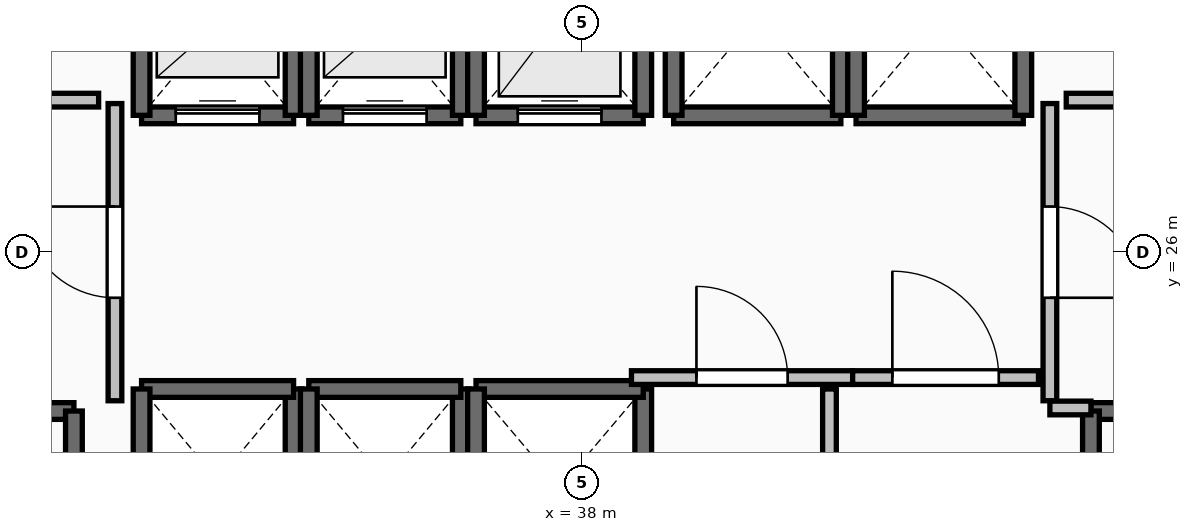
"""IFC4 building model, lengths in metres.
Left out: names, types, materials, properties, quantities, classifications, styles, units other than length and angle.
Written with IfcOpenShell. Run it as: python <this file> out.ifc"""

import sys

from ifc_helpers import new_model, si_unit, direction, frame, frame_2d, origin, place, context, subcontext, project, spatial, rectangle, extrude, element, fill, save


model = new_model("IFC4")
c1 = context("Model", 3, precision=1e-05, world=origin(), true_north=direction((0.0, 1.0)))
c2 = subcontext(c1, "Body", "Model", "MODEL_VIEW")
j1 = project(units=[si_unit("LENGTHUNIT", "METRE"), si_unit("PLANEANGLEUNIT", "RADIAN")], contexts=[c1])
p1 = place(None, origin())
s1 = spatial("IfcSite", under=j1, at=p1, CompositionType="ELEMENT")
p2 = place(p1, origin())
s2 = spatial("IfcBuilding", under=s1, at=p2, CompositionType="ELEMENT")
p3 = place(p2, frame((0.0, 0.0, 69.5)))
s3 = spatial("IfcBuildingStorey", under=s2, at=p3, CompositionType="ELEMENT", Elevation=69.5)
p4 = place(p3, frame((27.94, 23.91, 0.0), z_axis=(0.0, 0.0, 1.0), x_axis=(1.0, 0.0, 0.0)))
e1 = element("IfcWall", 1, at=p4, inside=s3, PredefinedType="SOLIDWALL", context=c2, shape_type="SweptSolid", body=[
    extrude(rectangle(XDim=3.37, YDim=0.22, at=frame_2d((1.685, 0.0))), origin(), (0.0, 0.0, 1.0), 4.5),
])
p5 = place(p4, frame((1.135, 0.0, 0.0)))
e2 = element("IfcOpeningElement", 2, at=p5, cuts=e1, PredefinedType="OPENING", context=c2, shape_type="SweptSolid", body=[
    extrude(rectangle(XDim=1.1, YDim=2.15, at=frame_2d((0.55, 1.075))), frame((0.0, 0.125, 0.0), z_axis=(0.0, -1.0, 0.0), x_axis=(1.0, 0.0, 0.0)), (0.0, 0.0, 1.0), 0.25),
])
p6 = place(p3, frame((31.31, 23.91, 0.0), z_axis=(0.0, 0.0, 1.0), x_axis=(0.0, -1.0, 0.0)))
e3 = element("IfcWall", 3, at=p6, inside=s3, PredefinedType="SOLIDWALL", context=c2, shape_type="SweptSolid", body=[
    extrude(rectangle(XDim=7.42, YDim=0.22, at=frame_2d((3.71, 0.0))), origin(), (0.0, 0.0, 1.0), 4.5),
])
p7 = place(p3, frame((44.69, 23.91, 0.0), z_axis=(0.0, 0.0, 1.0), x_axis=(1.0, 0.0, 0.0)))
e4 = element("IfcWall", 4, at=p7, inside=s3, PredefinedType="SOLIDWALL", context=c2, shape_type="SweptSolid", body=[
    extrude(rectangle(XDim=3.37, YDim=0.22, at=frame_2d((1.685, 0.0))), origin(), (0.0, 0.0, 1.0), 4.5),
])
p8 = place(p7, frame((1.135, 0.0, 0.0)))
e5 = element("IfcOpeningElement", 5, at=p8, cuts=e4, PredefinedType="OPENING", context=c2, shape_type="SweptSolid", body=[
    extrude(rectangle(XDim=1.1, YDim=2.15, at=frame_2d((0.55, 1.075))), frame((0.0, 0.125, 0.0), z_axis=(0.0, -1.0, 0.0), x_axis=(1.0, 0.0, 0.0)), (0.0, 0.0, 1.0), 0.25),
])
p9 = place(p3, frame((44.69, 16.49, 0.0), z_axis=(0.0, 0.0, 1.0), x_axis=(0.0, 1.0, 0.0)))
e6 = element("IfcWall", 6, at=p9, inside=s3, PredefinedType="SOLIDWALL", context=c2, shape_type="SweptSolid", body=[
    extrude(rectangle(XDim=7.42, YDim=0.22, at=frame_2d((3.71, 0.0))), origin(), (0.0, 0.0, 1.0), 4.5),
])
p10 = place(p3, frame((32.2, 27.8, 0.0), z_axis=(0.0, 0.0, 1.0), x_axis=(1.0, 0.0, 0.0)))
e7 = element("IfcWall", 7, at=p10, inside=s3, PredefinedType="SOLIDWALL", context=c2, shape_type="SweptSolid", body=[
    extrude(rectangle(XDim=2.0, YDim=0.22, at=frame_2d((1.0, 0.0))), origin(), (0.0, 0.0, 1.0), 4.5),
])
p11 = place(p10, frame((0.45, 0.0, 0.0)))
e8 = element("IfcOpeningElement", 8, at=p11, cuts=e7, PredefinedType="OPENING", context=c2, shape_type="SweptSolid", body=[
    extrude(rectangle(XDim=1.1, YDim=2.2, at=frame_2d((0.55, 1.1))), frame((0.0, 0.125, 0.0), z_axis=(0.0, -1.0, 0.0), x_axis=(1.0, 0.0, 0.0)), (0.0, 0.0, 1.0), 0.25),
])
for number, where, z_axis, x_axis in (
    (9, (34.2, 27.8, 0.0), (0.0, 0.0, 1.0), (0.0, 1.0, 0.0)),
    (10, (32.2, 30.2, 0.0), (0.0, 0.0, 1.0), (0.0, -1.0, 0.0)),
):
    element("IfcWall", number, at=place(p3, frame(where, z_axis=z_axis, x_axis=x_axis)), inside=s3, PredefinedType="SOLIDWALL", context=c2, shape_type="SweptSolid", body=[
        extrude(rectangle(XDim=2.4, YDim=0.22, at=frame_2d((1.2, 0.0))), origin(), (0.0, 0.0, 1.0), 4.5),
    ])
p12 = place(p3, frame((34.4, 27.8, 0.0), z_axis=(0.0, 0.0, 1.0), x_axis=(1.0, 0.0, 0.0)))
e11 = element("IfcWall", 11, at=p12, inside=s3, PredefinedType="SOLIDWALL", context=c2, shape_type="SweptSolid", body=[
    extrude(rectangle(XDim=2.0, YDim=0.22, at=frame_2d((1.0, 0.0))), origin(), (0.0, 0.0, 1.0), 4.5),
])
p13 = place(p12, frame((0.45, 0.0, 0.0)))
e12 = element("IfcOpeningElement", 12, at=p13, cuts=e11, PredefinedType="OPENING", context=c2, shape_type="SweptSolid", body=[
    extrude(rectangle(XDim=1.1, YDim=2.2, at=frame_2d((0.55, 1.1))), frame((0.0, 0.125, 0.0), z_axis=(0.0, -1.0, 0.0), x_axis=(1.0, 0.0, 0.0)), (0.0, 0.0, 1.0), 0.25),
])
for number, where, z_axis, x_axis in (
    (13, (36.4, 27.8, 0.0), (0.0, 0.0, 1.0), (0.0, 1.0, 0.0)),
    (14, (34.4, 30.2, 0.0), (0.0, 0.0, 1.0), (0.0, -1.0, 0.0)),
):
    element("IfcWall", number, at=place(p3, frame(where, z_axis=z_axis, x_axis=x_axis)), inside=s3, PredefinedType="SOLIDWALL", context=c2, shape_type="SweptSolid", body=[
        extrude(rectangle(XDim=2.4, YDim=0.22, at=frame_2d((1.2, 0.0))), origin(), (0.0, 0.0, 1.0), 4.5),
    ])
p14 = place(p3, frame((36.6, 27.8, 0.0), z_axis=(0.0, 0.0, 1.0), x_axis=(1.0, 0.0, 0.0)))
e15 = element("IfcWall", 15, at=p14, inside=s3, PredefinedType="SOLIDWALL", context=c2, shape_type="SweptSolid", body=[
    extrude(rectangle(XDim=2.2, YDim=0.22, at=frame_2d((1.1, 0.0))), origin(), (0.0, 0.0, 1.0), 4.5),
])
p15 = place(p14, frame((0.55, 0.0, 0.0)))
e16 = element("IfcOpeningElement", 16, at=p15, cuts=e15, PredefinedType="OPENING", context=c2, shape_type="SweptSolid", body=[
    extrude(rectangle(XDim=1.1, YDim=2.2, at=frame_2d((0.55, 1.1))), frame((0.0, 0.125, 0.0), z_axis=(0.0, -1.0, 0.0), x_axis=(1.0, 0.0, 0.0)), (0.0, 0.0, 1.0), 0.25),
])
for number, where, z_axis, x_axis in (
    (17, (38.8, 27.8, 0.0), (0.0, 0.0, 1.0), (0.0, 1.0, 0.0)),
    (18, (36.6, 30.4, 0.0), (0.0, 0.0, 1.0), (0.0, -1.0, 0.0)),
):
    element("IfcWall", number, at=place(p3, frame(where, z_axis=z_axis, x_axis=x_axis)), inside=s3, PredefinedType="SOLIDWALL", context=c2, shape_type="SweptSolid", body=[
        extrude(rectangle(XDim=2.6, YDim=0.22, at=frame_2d((1.3, 0.0))), origin(), (0.0, 0.0, 1.0), 4.5),
    ])
p16 = place(p3, frame((34.2, 21.8, 0.0), z_axis=(0.0, 0.0, 1.0), x_axis=(0.0, 1.0, 0.0)))
e19 = element("IfcWall", 19, at=p16, inside=s3, PredefinedType="SOLIDWALL", context=c2, shape_type="SweptSolid", body=[
    extrude(rectangle(XDim=2.4, YDim=0.22, at=frame_2d((1.2, 0.0))), origin(), (0.0, 0.0, 1.0), 4.5),
])
p17 = place(p3, frame((34.2, 24.2, 0.0), z_axis=(0.0, 0.0, 1.0), x_axis=(-1.0, 0.0, 0.0)))
e20 = element("IfcWall", 20, at=p17, inside=s3, PredefinedType="SOLIDWALL", context=c2, shape_type="SweptSolid", body=[
    extrude(rectangle(XDim=2.0, YDim=0.22, at=frame_2d((1.0, 0.0))), origin(), (0.0, 0.0, 1.0), 4.5),
])
for number, where, z_axis, x_axis in (
    (21, (32.2, 24.2, 0.0), (0.0, 0.0, 1.0), (0.0, -1.0, 0.0)),
    (22, (36.4, 21.8, 0.0), (0.0, 0.0, 1.0), (0.0, 1.0, 0.0)),
):
    element("IfcWall", number, at=place(p3, frame(where, z_axis=z_axis, x_axis=x_axis)), inside=s3, PredefinedType="SOLIDWALL", context=c2, shape_type="SweptSolid", body=[
        extrude(rectangle(XDim=2.4, YDim=0.22, at=frame_2d((1.2, 0.0))), origin(), (0.0, 0.0, 1.0), 4.5),
    ])
p18 = place(p3, frame((36.4, 24.2, 0.0), z_axis=(0.0, 0.0, 1.0), x_axis=(-1.0, 0.0, 0.0)))
e23 = element("IfcWall", 23, at=p18, inside=s3, PredefinedType="SOLIDWALL", context=c2, shape_type="SweptSolid", body=[
    extrude(rectangle(XDim=2.0, YDim=0.22, at=frame_2d((1.0, 0.0))), origin(), (0.0, 0.0, 1.0), 4.5),
])
p19 = place(p3, frame((34.4, 24.2, 0.0), z_axis=(0.0, 0.0, 1.0), x_axis=(0.0, -1.0, 0.0)))
e24 = element("IfcWall", 24, at=p19, inside=s3, PredefinedType="SOLIDWALL", context=c2, shape_type="SweptSolid", body=[
    extrude(rectangle(XDim=2.4, YDim=0.22, at=frame_2d((1.2, 0.0))), origin(), (0.0, 0.0, 1.0), 4.5),
])
p20 = place(p3, frame((38.8, 21.6, 0.0), z_axis=(0.0, 0.0, 1.0), x_axis=(0.0, 1.0, 0.0)))
e25 = element("IfcWall", 25, at=p20, inside=s3, PredefinedType="SOLIDWALL", context=c2, shape_type="SweptSolid", body=[
    extrude(rectangle(XDim=2.6, YDim=0.22, at=frame_2d((1.3, 0.0))), origin(), (0.0, 0.0, 1.0), 4.5),
])
p21 = place(p3, frame((38.8, 24.2, 0.0), z_axis=(0.0, 0.0, 1.0), x_axis=(-1.0, 0.0, 0.0)))
e26 = element("IfcWall", 26, at=p21, inside=s3, PredefinedType="SOLIDWALL", context=c2, shape_type="SweptSolid", body=[
    extrude(rectangle(XDim=2.2, YDim=0.22, at=frame_2d((1.1, 0.0))), origin(), (0.0, 0.0, 1.0), 4.5),
])
p22 = place(p3, frame((36.6, 24.2, 0.0), z_axis=(0.0, 0.0, 1.0), x_axis=(0.0, -1.0, 0.0)))
e27 = element("IfcWall", 27, at=p22, inside=s3, PredefinedType="SOLIDWALL", context=c2, shape_type="SweptSolid", body=[
    extrude(rectangle(XDim=2.6, YDim=0.22, at=frame_2d((1.3, 0.0))), origin(), (0.0, 0.0, 1.0), 4.5),
])
p23 = place(p3, frame((39.2, 27.8, 0.0), z_axis=(0.0, 0.0, 1.0), x_axis=(1.0, 0.0, 0.0)))
e28 = element("IfcWall", 28, at=p23, inside=s3, PredefinedType="SOLIDWALL", context=c2, shape_type="SweptSolid", body=[
    extrude(rectangle(XDim=2.2, YDim=0.22, at=frame_2d((1.1, 0.0))), origin(), (0.0, 0.0, 1.0), 4.5),
])
for number, where, z_axis, x_axis in (
    (29, (41.4, 27.8, 0.0), (0.0, 0.0, 1.0), (0.0, 1.0, 0.0)),
    (30, (39.2, 30.4, 0.0), (0.0, 0.0, 1.0), (0.0, -1.0, 0.0)),
):
    element("IfcWall", number, at=place(p3, frame(where, z_axis=z_axis, x_axis=x_axis)), inside=s3, PredefinedType="SOLIDWALL", context=c2, shape_type="SweptSolid", body=[
        extrude(rectangle(XDim=2.6, YDim=0.22, at=frame_2d((1.3, 0.0))), origin(), (0.0, 0.0, 1.0), 4.5),
    ])
p24 = place(p3, frame((41.6, 27.8, 0.0), z_axis=(0.0, 0.0, 1.0), x_axis=(1.0, 0.0, 0.0)))
e31 = element("IfcWall", 31, at=p24, inside=s3, PredefinedType="SOLIDWALL", context=c2, shape_type="SweptSolid", body=[
    extrude(rectangle(XDim=2.2, YDim=0.22, at=frame_2d((1.1, 0.0))), origin(), (0.0, 0.0, 1.0), 4.5),
])
for number, where, z_axis, x_axis in (
    (32, (43.8, 27.8, 0.0), (0.0, 0.0, 1.0), (0.0, 1.0, 0.0)),
    (33, (41.6, 30.4, 0.0), (0.0, 0.0, 1.0), (0.0, -1.0, 0.0)),
):
    element("IfcWall", number, at=place(p3, frame(where, z_axis=z_axis, x_axis=x_axis)), inside=s3, PredefinedType="SOLIDWALL", context=c2, shape_type="SweptSolid", body=[
        extrude(rectangle(XDim=2.6, YDim=0.22, at=frame_2d((1.3, 0.0))), origin(), (0.0, 0.0, 1.0), 4.5),
    ])
p25 = place(p3, frame((31.85, 24.045, 0.0), z_axis=(0.0, 0.0, 1.0), x_axis=(0.0, 1.0, 0.0)))
e34 = element("IfcWall", 34, at=p25, inside=s3, PredefinedType="PARTITIONING", context=c2, shape_type="SweptSolid", body=[
    extrude(rectangle(XDim=3.91, YDim=0.18, at=frame_2d((1.955, 0.0))), origin(), (0.0, 0.0, 1.0), 4.5),
])
p26 = place(p25, frame((1.355, 0.0, 0.0)))
e35 = element("IfcOpeningElement", 35, at=p26, cuts=e34, PredefinedType="OPENING", context=c2, shape_type="SweptSolid", body=[
    extrude(rectangle(XDim=1.2, YDim=2.15, at=frame_2d((0.6, 1.075))), frame((0.0, 0.105, 0.0), z_axis=(0.0, -1.0, 0.0), x_axis=(1.0, 0.0, 0.0)), (0.0, 0.0, 1.0), 0.21),
])
p27 = place(p3, frame((44.15, 27.955, 0.0), z_axis=(0.0, 0.0, 1.0), x_axis=(0.0, -1.0, 0.0)))
e36 = element("IfcWall", 36, at=p27, inside=s3, PredefinedType="PARTITIONING", context=c2, shape_type="SweptSolid", body=[
    extrude(rectangle(XDim=3.91, YDim=0.18, at=frame_2d((1.955, 0.0))), origin(), (0.0, 0.0, 1.0), 4.5),
])
p28 = place(p27, frame((1.355, 0.0, 0.0)))
e37 = element("IfcOpeningElement", 37, at=p28, cuts=e36, PredefinedType="OPENING", context=c2, shape_type="SweptSolid", body=[
    extrude(rectangle(XDim=1.2, YDim=2.15, at=frame_2d((0.6, 1.075))), frame((0.0, 0.105, 0.0), z_axis=(0.0, -1.0, 0.0), x_axis=(1.0, 0.0, 0.0)), (0.0, 0.0, 1.0), 0.21),
])
p29 = place(p3, frame((44.15, 23.95, 0.0), z_axis=(0.0, 0.0, 1.0), x_axis=(1.0, 0.0, 0.0)))
e38 = element("IfcWall", 38, at=p29, inside=s3, PredefinedType="PARTITIONING", context=c2, shape_type="SweptSolid", body=[
    extrude(rectangle(XDim=0.54, YDim=0.18, at=frame_2d((0.27, 0.0))), origin(), (0.0, 0.0, 1.0), 4.5),
])
p30 = place(p3, frame((38.645, 24.35, 0.0), z_axis=(0.0, 0.0, 1.0), x_axis=(1.0, 0.0, 0.0)))
e39 = element("IfcWall", 39, at=p30, inside=s3, PredefinedType="PARTITIONING", context=c2, shape_type="SweptSolid", body=[
    extrude(rectangle(XDim=2.91, YDim=0.18, at=frame_2d((1.455, 0.0))), origin(), (0.0, 0.0, 1.0), 4.5),
])
p31 = place(p30, frame((0.855, 0.0, 0.0)))
e40 = element("IfcOpeningElement", 40, at=p31, cuts=e39, PredefinedType="OPENING", context=c2, shape_type="SweptSolid", body=[
    extrude(rectangle(XDim=1.2, YDim=2.15, at=frame_2d((0.6, 1.075))), frame((0.0, 0.105, 0.0), z_axis=(0.0, -1.0, 0.0), x_axis=(1.0, 0.0, 0.0)), (0.0, 0.0, 1.0), 0.21),
])
p32 = place(p3, frame((41.555, 24.35, 0.0), z_axis=(0.0, 0.0, 1.0), x_axis=(1.0, 0.0, 0.0)))
e41 = element("IfcWall", 41, at=p32, inside=s3, PredefinedType="PARTITIONING", context=c2, shape_type="SweptSolid", body=[
    extrude(rectangle(XDim=2.445, YDim=0.18, at=frame_2d((1.223, 0.0))), origin(), (0.0, 0.0, 1.0), 4.5),
])
p33 = place(p32, frame((0.522, 0.0, 0.0)))
e42 = element("IfcOpeningElement", 42, at=p33, cuts=e41, PredefinedType="OPENING", context=c2, shape_type="SweptSolid", body=[
    extrude(rectangle(XDim=1.4, YDim=2.2, at=frame_2d((0.7, 1.1))), frame((0.0, 0.105, 0.0), z_axis=(0.0, -1.0, 0.0), x_axis=(1.0, 0.0, 0.0)), (0.0, 0.0, 1.0), 0.21),
])
p34 = place(p3, frame((41.25, 19.105, 0.0), z_axis=(0.0, 0.0, 1.0), x_axis=(0.0, 1.0, 0.0)))
e43 = element("IfcWall", 43, at=p34, inside=s3, PredefinedType="PARTITIONING", context=c2, shape_type="SweptSolid", body=[
    extrude(rectangle(XDim=5.095, YDim=0.18, at=frame_2d((2.547, 0.0))), origin(), (0.0, 0.0, 1.0), 4.5),
])
p35 = place(p34, frame((1.847, 0.0, 0.0)))
e44 = element("IfcOpeningElement", 44, at=p35, cuts=e43, PredefinedType="OPENING", context=c2, shape_type="SweptSolid", body=[
    extrude(rectangle(XDim=1.4, YDim=2.2, at=frame_2d((0.7, 1.1))), frame((0.0, 0.105, 0.0), z_axis=(0.0, -1.0, 0.0), x_axis=(1.0, 0.0, 0.0)), (0.0, 0.0, 1.0), 0.21),
])
for number, where, z_axis, x_axis in (
    (45, (31.635, 28.0, 0.0), (0.0, 0.0, 1.0), (-1.0, 0.0, 0.0)),
    (46, (45.28, 28.0, 0.0), (0.0, 0.0, 1.0), (-1.0, 0.0, 0.0)),
):
    element("IfcWall", number, at=place(p3, frame(where, z_axis=z_axis, x_axis=x_axis)), inside=s3, PredefinedType="PARTITIONING", context=c2, shape_type="SweptSolid", body=[
        extrude(rectangle(XDim=0.915, YDim=0.18, at=frame_2d((0.458, 0.0))), origin(), (0.0, 0.0, 1.0), 4.5),
    ])
p36 = place(p11, origin())
e47 = element("IfcDoor", 47, at=p36, inside=s3, OperationType="SLIDING_TO_LEFT", PredefinedType="DOOR", context=c2, shape_type="SweptSolid", body=[
    extrude(rectangle(XDim=1.1, YDim=2.2, at=frame_2d((0.55, 1.1))), frame((0.0, 0.025, 0.0), z_axis=(0.0, -1.0, 0.0), x_axis=(1.0, 0.0, 0.0)), (0.0, 0.0, 1.0), 0.05),
])
fill(e8, e47)
p37 = place(p13, origin())
e48 = element("IfcDoor", 48, at=p37, inside=s3, OperationType="SLIDING_TO_LEFT", PredefinedType="DOOR", context=c2, shape_type="SweptSolid", body=[
    extrude(rectangle(XDim=1.1, YDim=2.2, at=frame_2d((0.55, 1.1))), frame((0.0, 0.025, 0.0), z_axis=(0.0, -1.0, 0.0), x_axis=(1.0, 0.0, 0.0)), (0.0, 0.0, 1.0), 0.05),
])
fill(e12, e48)
p38 = place(p15, origin())
e49 = element("IfcDoor", 49, at=p38, inside=s3, OperationType="SLIDING_TO_LEFT", PredefinedType="DOOR", context=c2, shape_type="SweptSolid", body=[
    extrude(rectangle(XDim=1.1, YDim=2.2, at=frame_2d((0.55, 1.1))), frame((0.0, 0.025, 0.0), z_axis=(0.0, -1.0, 0.0), x_axis=(1.0, 0.0, 0.0)), (0.0, 0.0, 1.0), 0.05),
])
fill(e16, e49)
p39 = place(p26, origin())
e50 = element("IfcDoor", 50, at=p39, inside=s3, OperationType="SINGLE_SWING_RIGHT", PredefinedType="DOOR", context=c2, shape_type="SweptSolid", body=[
    extrude(rectangle(XDim=1.2, YDim=2.15, at=frame_2d((0.6, 1.075))), frame((0.0, 0.025, 0.0), z_axis=(0.0, -1.0, 0.0), x_axis=(1.0, 0.0, 0.0)), (0.0, 0.0, 1.0), 0.05),
])
fill(e35, e50)
p40 = place(p28, origin())
e51 = element("IfcDoor", 51, at=p40, inside=s3, OperationType="SINGLE_SWING_RIGHT", PredefinedType="DOOR", context=c2, shape_type="SweptSolid", body=[
    extrude(rectangle(XDim=1.2, YDim=2.15, at=frame_2d((0.6, 1.075))), frame((0.0, 0.025, 0.0), z_axis=(0.0, -1.0, 0.0), x_axis=(1.0, 0.0, 0.0)), (0.0, 0.0, 1.0), 0.05),
])
fill(e37, e51)
p41 = place(p31, origin())
e52 = element("IfcDoor", 52, at=p41, inside=s3, OperationType="SINGLE_SWING_LEFT", PredefinedType="DOOR", context=c2, shape_type="SweptSolid", body=[
    extrude(rectangle(XDim=1.2, YDim=2.15, at=frame_2d((0.6, 1.075))), frame((0.0, 0.025, 0.0), z_axis=(0.0, -1.0, 0.0), x_axis=(1.0, 0.0, 0.0)), (0.0, 0.0, 1.0), 0.05),
])
fill(e40, e52)
p42 = place(p33, origin())
e53 = element("IfcDoor", 53, at=p42, inside=s3, OperationType="DOUBLE_SWING_LEFT", PredefinedType="DOOR", context=c2, shape_type="SweptSolid", body=[
    extrude(rectangle(XDim=1.4, YDim=2.2, at=frame_2d((0.7, 1.1))), frame((0.0, 0.025, 0.0), z_axis=(0.0, -1.0, 0.0), x_axis=(1.0, 0.0, 0.0)), (0.0, 0.0, 1.0), 0.05),
])
fill(e42, e53)
save(model, sys.argv[1])
